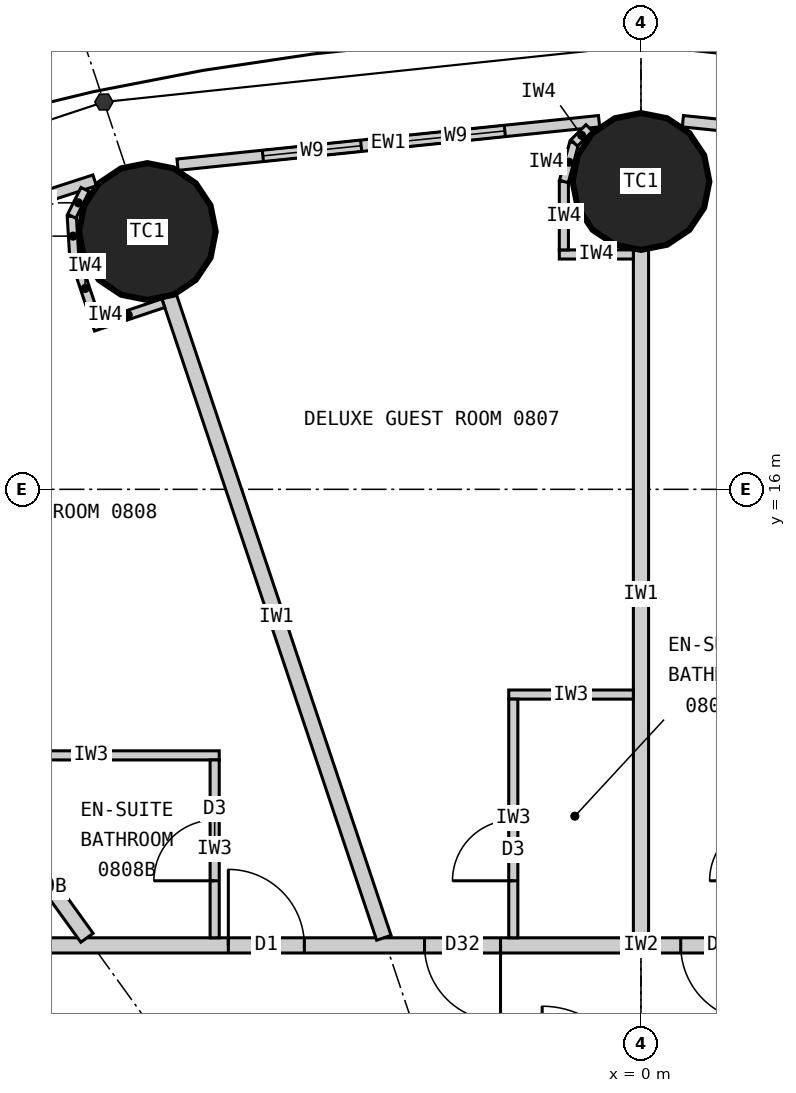
"""IFC4 building model, lengths in metres.
Left out: names, types, materials, properties, quantities, classifications, styles, units other than length and angle.
Written with IfcOpenShell. Run it as: python <this file> out.ifc"""

import sys

from ifc_helpers import new_model, si_unit, direction, frame, frame_2d, origin, origin_2d, place, context, subcontext, project, spatial, rectangle, circle, extrude, element, fill, save


model = new_model("IFC4")
c1 = context("Model", 3, precision=1e-05, world=origin(), true_north=direction((0.0, 1.0)))
c2 = subcontext(c1, "Body", "Model", "MODEL_VIEW")
j1 = project(units=[si_unit("LENGTHUNIT", "METRE"), si_unit("PLANEANGLEUNIT", "RADIAN")], contexts=[c1])
p1 = place(None, origin())
s1 = spatial("IfcSite", under=j1, at=p1, CompositionType="ELEMENT")
p2 = place(p1, origin())
s2 = spatial("IfcBuilding", under=s1, at=p2, CompositionType="ELEMENT")
p3 = place(p2, frame((0.0, 0.0, 39.3)))
s3 = spatial("IfcBuildingStorey", under=s2, at=p3, CompositionType="ELEMENT", Elevation=39.3)
for number, where, z_axis, x_axis in (
    (1, (0.0, 20.05, 0.0), (0.0, 0.0, 1.0), (1.0, 0.0, 0.0)),
    (2, (-6.495, 19.391, 0.0), (0.0, 0.0, 1.0), (1.0, 0.0, 0.0)),
):
    element("IfcColumn", number, at=place(p3, frame(where, z_axis=z_axis, x_axis=x_axis)), inside=s3, PredefinedType="COLUMN", context=c2, shape_type="SweptSolid", body=[
        extrude(circle(Radius=0.9, at=origin_2d()), origin(), (0.0, 0.0, 1.0), 3.3),
    ])
p4 = place(p3, frame((6.098, 20.271, 0.0), z_axis=(0.0, 0.0, 1.0), x_axis=(-0.994723735084, 0.102589915983, 0.0)))
e3 = element("IfcWall", 3, at=p4, inside=s3, PredefinedType="ELEMENTEDWALL", context=c2, shape_type="SweptSolid", body=[
    extrude(rectangle(XDim=5.576, YDim=0.15, at=frame_2d((2.788, 0.0))), origin(), (0.0, 0.0, 1.0), 3.12),
])
p5 = place(p4, frame((1.129, 0.0, 0.9)))
e4 = element("IfcOpeningElement", 4, at=p5, cuts=e3, PredefinedType="OPENING", context=c2, shape_type="SweptSolid", body=[
    extrude(rectangle(XDim=1.3, YDim=1.9, at=frame_2d((0.65, 0.95))), frame((0.0, 0.085, 0.0), z_axis=(0.0, -1.0, 0.0), x_axis=(1.0, 0.0, 0.0)), (0.0, 0.0, 1.0), 0.17),
])
p6 = place(p4, frame((3.029, 0.0, 0.9)))
e5 = element("IfcOpeningElement", 5, at=p6, cuts=e3, PredefinedType="OPENING", context=c2, shape_type="SweptSolid", body=[
    extrude(rectangle(XDim=1.3, YDim=1.9, at=frame_2d((0.65, 0.95))), frame((0.0, 0.085, 0.0), z_axis=(0.0, -1.0, 0.0), x_axis=(1.0, 0.0, 0.0)), (0.0, 0.0, 1.0), 0.17),
])
p7 = place(p3, frame((-0.551, 20.843, 0.0), z_axis=(0.0, 0.0, 1.0), x_axis=(-0.994723735084, -0.102589915983, 0.0)))
e6 = element("IfcWall", 6, at=p7, inside=s3, PredefinedType="ELEMENTEDWALL", context=c2, shape_type="SweptSolid", body=[
    extrude(rectangle(XDim=5.576, YDim=0.15, at=frame_2d((2.788, 0.0))), origin(), (0.0, 0.0, 1.0), 3.12),
])
p8 = place(p7, frame((1.247, 0.0, 0.9)))
e7 = element("IfcOpeningElement", 7, at=p8, cuts=e6, PredefinedType="OPENING", context=c2, shape_type="SweptSolid", body=[
    extrude(rectangle(XDim=1.3, YDim=1.9, at=frame_2d((0.65, 0.95))), frame((0.0, 0.085, 0.0), z_axis=(0.0, -1.0, 0.0), x_axis=(1.0, 0.0, 0.0)), (0.0, 0.0, 1.0), 0.17),
])
p9 = place(p7, frame((3.147, 0.0, 0.9)))
e8 = element("IfcOpeningElement", 8, at=p9, cuts=e6, PredefinedType="OPENING", context=c2, shape_type="SweptSolid", body=[
    extrude(rectangle(XDim=1.3, YDim=1.9, at=frame_2d((0.65, 0.95))), frame((0.0, 0.085, 0.0), z_axis=(0.0, -1.0, 0.0), x_axis=(1.0, 0.0, 0.0)), (0.0, 0.0, 1.0), 0.17),
])
p10 = place(p3, frame((-7.188, 20.065, 0.0), z_axis=(0.0, 0.0, 1.0), x_axis=(-0.951138486029, -0.308764603532, 0.0)))
e9 = element("IfcWall", 9, at=p10, inside=s3, PredefinedType="ELEMENTEDWALL", context=c2, shape_type="SweptSolid", body=[
    extrude(rectangle(XDim=5.444, YDim=0.15, at=frame_2d((2.722, 0.0))), origin(), (0.0, 0.0, 1.0), 3.12),
])
p11 = place(p10, frame((1.284, 0.0, 0.9)))
e10 = element("IfcOpeningElement", 10, at=p11, cuts=e9, PredefinedType="OPENING", context=c2, shape_type="SweptSolid", body=[
    extrude(rectangle(XDim=1.3, YDim=1.9, at=frame_2d((0.65, 0.95))), frame((0.0, 0.085, 0.0), z_axis=(0.0, -1.0, 0.0), x_axis=(1.0, 0.0, 0.0)), (0.0, 0.0, 1.0), 0.17),
])
p12 = place(p10, frame((3.184, 0.0, 0.9)))
e11 = element("IfcOpeningElement", 11, at=p12, cuts=e9, PredefinedType="OPENING", context=c2, shape_type="SweptSolid", body=[
    extrude(rectangle(XDim=1.3, YDim=1.9, at=frame_2d((0.65, 0.95))), frame((0.0, 0.085, 0.0), z_axis=(0.0, -1.0, 0.0), x_axis=(1.0, 0.0, 0.0)), (0.0, 0.0, 1.0), 0.17),
])
p13 = place(p3, frame((-14.1, 10.0, 0.0), z_axis=(0.0, 0.0, 1.0), x_axis=(1.0, 0.0, 0.0)))
e12 = element("IfcWall", 12, at=p13, inside=s3, PredefinedType="PARTITIONING", context=c2, shape_type="SweptSolid", body=[
    extrude(rectangle(XDim=28.2, YDim=0.2, at=frame_2d((14.1, 0.0))), origin(), (0.0, 0.0, 1.0), 3.12),
])
p14 = place(p13, frame((23.477, 0.0, 0.0)))
e13 = element("IfcOpeningElement", 13, at=p14, cuts=e12, PredefinedType="OPENING", context=c2, shape_type="SweptSolid", body=[
    extrude(rectangle(XDim=1.0, YDim=2.2, at=frame_2d((0.5, 1.1))), frame((0.0, 0.11, 0.0), z_axis=(0.0, -1.0, 0.0), x_axis=(1.0, 0.0, 0.0)), (0.0, 0.0, 1.0), 0.22),
])
p15 = place(p13, frame((18.529, 0.0, 0.0)))
e14 = element("IfcOpeningElement", 14, at=p15, cuts=e12, PredefinedType="OPENING", context=c2, shape_type="SweptSolid", body=[
    extrude(rectangle(XDim=1.0, YDim=2.2, at=frame_2d((0.5, 1.1))), frame((0.0, 0.11, 0.0), z_axis=(0.0, -1.0, 0.0), x_axis=(1.0, 0.0, 0.0)), (0.0, 0.0, 1.0), 0.22),
])
p16 = place(p13, frame((14.623, 0.0, 0.0)))
e15 = element("IfcOpeningElement", 15, at=p16, cuts=e12, PredefinedType="OPENING", context=c2, shape_type="SweptSolid", body=[
    extrude(rectangle(XDim=1.0, YDim=2.2, at=frame_2d((0.5, 1.1))), frame((0.0, 0.11, 0.0), z_axis=(0.0, -1.0, 0.0), x_axis=(1.0, 0.0, 0.0)), (0.0, 0.0, 1.0), 0.22),
])
p17 = place(p13, frame((11.252, 0.0, 0.0)))
e16 = element("IfcOpeningElement", 16, at=p17, cuts=e12, PredefinedType="OPENING", context=c2, shape_type="SweptSolid", body=[
    extrude(rectangle(XDim=1.0, YDim=2.1, at=frame_2d((0.5, 1.05))), frame((0.0, 0.11, 0.0), z_axis=(0.0, -1.0, 0.0), x_axis=(1.0, 0.0, 0.0)), (0.0, 0.0, 1.0), 0.22),
])
p18 = place(p13, frame((8.671, 0.0, 0.0)))
e17 = element("IfcOpeningElement", 17, at=p18, cuts=e12, PredefinedType="OPENING", context=c2, shape_type="SweptSolid", body=[
    extrude(rectangle(XDim=1.0, YDim=2.2, at=frame_2d((0.5, 1.1))), frame((0.0, 0.11, 0.0), z_axis=(0.0, -1.0, 0.0), x_axis=(1.0, 0.0, 0.0)), (0.0, 0.0, 1.0), 0.22),
])
p19 = place(p13, frame((1.616, 0.0, 0.0)))
e18 = element("IfcOpeningElement", 18, at=p19, cuts=e12, PredefinedType="OPENING", context=c2, shape_type="SweptSolid", body=[
    extrude(rectangle(XDim=1.0, YDim=2.2, at=frame_2d((0.5, 1.1))), frame((0.0, 0.11, 0.0), z_axis=(0.0, -1.0, 0.0), x_axis=(1.0, 0.0, 0.0)), (0.0, 0.0, 1.0), 0.22),
])
p20 = place(p3, frame((0.0, 10.1, 0.0), z_axis=(0.0, 0.0, 1.0), x_axis=(0.0, 1.0, 0.0)))
e19 = element("IfcWall", 19, at=p20, inside=s3, PredefinedType="PARTITIONING", context=c2, shape_type="SweptSolid", body=[
    extrude(rectangle(XDim=9.05, YDim=0.2, at=frame_2d((4.525, 0.0))), origin(), (0.0, 0.0, 1.0), 2.32),
])
p21 = place(p3, frame((-3.383, 10.1, 0.0), z_axis=(0.0, 0.0, 1.0), x_axis=(-0.317593727596, 0.948226884344, 0.0)))
e20 = element("IfcWall", 20, at=p21, inside=s3, PredefinedType="PARTITIONING", context=c2, shape_type="SweptSolid", body=[
    extrude(rectangle(XDim=8.899, YDim=0.2, at=frame_2d((4.449, 0.0))), origin(), (0.0, 0.0, 1.0), 2.32),
])
p22 = place(p3, frame((-7.289, 10.1, 0.0), z_axis=(0.0, 0.0, 1.0), x_axis=(-0.585216319319, 0.810877216108, 0.0)))
e21 = element("IfcWall", 21, at=p22, inside=s3, PredefinedType="PARTITIONING", context=c2, shape_type="SweptSolid", body=[
    extrude(rectangle(XDim=8.16, YDim=0.2, at=frame_2d((4.08, 0.0))), origin(), (0.0, 0.0, 1.0), 2.32),
])
p23 = place(p3, frame((-0.1, 13.3, 0.0), z_axis=(0.0, 0.0, 1.0), x_axis=(-1.0, 0.0, 0.0)))
e22 = element("IfcWall", 22, at=p23, inside=s3, PredefinedType="PARTITIONING", context=c2, shape_type="SweptSolid", body=[
    extrude(rectangle(XDim=1.64, YDim=0.12, at=frame_2d((0.82, 0.0))), origin(), (0.0, 0.0, 1.0), 3.12),
])
p24 = place(p3, frame((-1.68, 10.1, 0.0), z_axis=(0.0, 0.0, 1.0), x_axis=(0.0, 1.0, 0.0)))
e23 = element("IfcWall", 23, at=p24, inside=s3, PredefinedType="PARTITIONING", context=c2, shape_type="SweptSolid", body=[
    extrude(rectangle(XDim=3.14, YDim=0.12, at=frame_2d((1.57, 0.0))), origin(), (0.0, 0.0, 1.0), 3.12),
])
p25 = place(p24, frame((0.75, 0.0, 0.0)))
e24 = element("IfcOpeningElement", 24, at=p25, cuts=e23, PredefinedType="OPENING", context=c2, shape_type="SweptSolid", body=[
    extrude(rectangle(XDim=0.8, YDim=2.1, at=frame_2d((0.4, 1.05))), frame((0.0, 0.07, 0.0), z_axis=(0.0, -1.0, 0.0), x_axis=(1.0, 0.0, 0.0)), (0.0, 0.0, 1.0), 0.14),
])
p26 = place(p3, frame((-8.921, 12.5, 0.0), z_axis=(0.0, 0.0, 1.0), x_axis=(1.0, 0.0, 0.0)))
e25 = element("IfcWall", 25, at=p26, inside=s3, PredefinedType="PARTITIONING", context=c2, shape_type="SweptSolid", body=[
    extrude(rectangle(XDim=3.372, YDim=0.12, at=frame_2d((1.686, 0.0))), origin(), (0.0, 0.0, 1.0), 3.12),
])
p27 = place(p3, frame((-5.609, 10.1, 0.0), z_axis=(0.0, 0.0, 1.0), x_axis=(0.0, 1.0, 0.0)))
e26 = element("IfcWall", 26, at=p27, inside=s3, PredefinedType="PARTITIONING", context=c2, shape_type="SweptSolid", body=[
    extrude(rectangle(XDim=2.34, YDim=0.12, at=frame_2d((1.17, 0.0))), origin(), (0.0, 0.0, 1.0), 3.12),
])
p28 = place(p27, frame((0.75, 0.0, 0.0)))
e27 = element("IfcOpeningElement", 27, at=p28, cuts=e26, PredefinedType="OPENING", context=c2, shape_type="SweptSolid", body=[
    extrude(rectangle(XDim=0.8, YDim=2.1, at=frame_2d((0.4, 1.05))), frame((0.0, 0.07, 0.0), z_axis=(0.0, -1.0, 0.0), x_axis=(1.0, 0.0, 0.0)), (0.0, 0.0, 1.0), 0.14),
])
p29 = place(p3, frame((-0.1, 19.09, 0.0), z_axis=(0.0, 0.0, 1.0), x_axis=(-1.0, 0.0, 0.0)))
e28 = element("IfcWall", 28, at=p29, inside=s3, PredefinedType="PARTITIONING", context=c2, shape_type="SweptSolid", body=[
    extrude(rectangle(XDim=0.974, YDim=0.12, at=frame_2d((0.487, 0.0))), origin(), (0.0, 0.0, 1.0), 3.12),
])
p30 = place(p3, frame((-1.015, 19.15, 0.0), z_axis=(0.0, 0.0, 1.0), x_axis=(0.0, 1.0, 0.0)))
e29 = element("IfcWall", 29, at=p30, inside=s3, PredefinedType="PARTITIONING", context=c2, shape_type="SweptSolid", body=[
    extrude(rectangle(XDim=0.9, YDim=0.12, at=frame_2d((0.45, 0.0))), origin(), (0.0, 0.0, 1.0), 3.12),
])
p31 = place(p3, frame((-1.015, 20.05, 0.0), z_axis=(0.0, 0.0, 1.0), x_axis=(0.258906465625, 0.96590239779, 0.0)))
e30 = element("IfcWall", 30, at=p31, inside=s3, PredefinedType="PARTITIONING", context=c2, shape_type="SweptSolid", body=[
    extrude(rectangle(XDim=0.525, YDim=0.12, at=frame_2d((0.263, 0.0))), origin(), (0.0, 0.0, 1.0), 3.12),
])
p32 = place(p3, frame((-0.879, 20.557, 0.0), z_axis=(0.0, 0.0, 1.0), x_axis=(0.707106781187, 0.707106781187, 0.0)))
e31 = element("IfcWall", 31, at=p32, inside=s3, PredefinedType="PARTITIONING", context=c2, shape_type="SweptSolid", body=[
    extrude(rectangle(XDim=0.279, YDim=0.12, at=frame_2d((0.14, 0.0))), origin(), (0.0, 0.0, 1.0), 3.12),
])
p33 = place(p3, frame((-6.285, 18.449, 0.0), z_axis=(0.0, 0.0, 1.0), x_axis=(-0.948281677008, -0.317430088446, 0.0)))
e32 = element("IfcWall", 32, at=p33, inside=s3, PredefinedType="PARTITIONING", context=c2, shape_type="SweptSolid", body=[
    extrude(rectangle(XDim=0.974, YDim=0.12, at=frame_2d((0.487, 0.0))), origin(), (0.0, 0.0, 1.0), 3.12),
])
p34 = place(p3, frame((-7.171, 18.216, 0.0), z_axis=(0.0, 0.0, 1.0), x_axis=(-0.317692409458, 0.94819382669, 0.0)))
e33 = element("IfcWall", 33, at=p34, inside=s3, PredefinedType="PARTITIONING", context=c2, shape_type="SweptSolid", body=[
    extrude(rectangle(XDim=0.9, YDim=0.12, at=frame_2d((0.45, 0.0))), origin(), (0.0, 0.0, 1.0), 3.12),
])
p35 = place(p3, frame((-7.457, 19.069, 0.0), z_axis=(0.0, 0.0, 1.0), x_axis=(-0.061365267648, 0.99811537606, 0.0)))
e34 = element("IfcWall", 34, at=p35, inside=s3, PredefinedType="PARTITIONING", context=c2, shape_type="SweptSolid", body=[
    extrude(rectangle(XDim=0.525, YDim=0.12, at=frame_2d((0.263, 0.0))), origin(), (0.0, 0.0, 1.0), 3.12),
])
p36 = place(p3, frame((-7.489, 19.593, 0.0), z_axis=(0.0, 0.0, 1.0), x_axis=(0.446218959337, 0.89492381817, 0.0)))
e35 = element("IfcWall", 35, at=p36, inside=s3, PredefinedType="PARTITIONING", context=c2, shape_type="SweptSolid", body=[
    extrude(rectangle(XDim=0.393, YDim=0.12, at=frame_2d((0.196, 0.0))), origin(), (0.0, 0.0, 1.0), 3.12),
])
p37 = place(p8, origin())
e36 = element("IfcWindow", 36, at=p37, inside=s3, PartitioningType="SINGLE_PANEL", PredefinedType="WINDOW", context=c2, shape_type="SweptSolid", body=[
    extrude(rectangle(XDim=1.3, YDim=1.9, at=frame_2d((0.65, 0.95))), frame((0.0, 0.03, 0.0), z_axis=(0.0, -1.0, 0.0), x_axis=(1.0, 0.0, 0.0)), (0.0, 0.0, 1.0), 0.06),
])
fill(e7, e36)
p38 = place(p9, origin())
e37 = element("IfcWindow", 37, at=p38, inside=s3, PartitioningType="SINGLE_PANEL", PredefinedType="WINDOW", context=c2, shape_type="SweptSolid", body=[
    extrude(rectangle(XDim=1.3, YDim=1.9, at=frame_2d((0.65, 0.95))), frame((0.0, 0.03, 0.0), z_axis=(0.0, -1.0, 0.0), x_axis=(1.0, 0.0, 0.0)), (0.0, 0.0, 1.0), 0.06),
])
fill(e8, e37)
p39 = place(p16, origin())
e38 = element("IfcDoor", 38, at=p39, inside=s3, OperationType="SINGLE_SWING_RIGHT", PredefinedType="DOOR", context=c2, shape_type="SweptSolid", body=[
    extrude(rectangle(XDim=1.0, YDim=2.2, at=frame_2d((0.5, 1.1))), frame((0.0, 0.025, 0.0), z_axis=(0.0, -1.0, 0.0), x_axis=(1.0, 0.0, 0.0)), (0.0, 0.0, 1.0), 0.05),
])
fill(e15, e38)
p40 = place(p25, origin())
e39 = element("IfcDoor", 39, at=p40, inside=s3, OperationType="SINGLE_SWING_LEFT", PredefinedType="DOOR", context=c2, shape_type="SweptSolid", body=[
    extrude(rectangle(XDim=0.8, YDim=2.1, at=frame_2d((0.4, 1.05))), frame((0.0, 0.025, 0.0), z_axis=(0.0, -1.0, 0.0), x_axis=(1.0, 0.0, 0.0)), (0.0, 0.0, 1.0), 0.05),
])
fill(e24, e39)
p41 = place(p17, origin())
e40 = element("IfcDoor", 40, at=p41, inside=s3, OperationType="SINGLE_SWING_RIGHT", PredefinedType="DOOR", context=c2, shape_type="SweptSolid", body=[
    extrude(rectangle(XDim=1.0, YDim=2.1, at=frame_2d((0.5, 1.05))), frame((0.0, 0.025, 0.0), z_axis=(0.0, -1.0, 0.0), x_axis=(1.0, 0.0, 0.0)), (0.0, 0.0, 1.0), 0.05),
])
fill(e16, e40)
p42 = place(p28, origin())
e41 = element("IfcDoor", 41, at=p42, inside=s3, OperationType="SINGLE_SWING_LEFT", PredefinedType="DOOR", context=c2, shape_type="SweptSolid", body=[
    extrude(rectangle(XDim=0.8, YDim=2.1, at=frame_2d((0.4, 1.05))), frame((0.0, 0.025, 0.0), z_axis=(0.0, -1.0, 0.0), x_axis=(1.0, 0.0, 0.0)), (0.0, 0.0, 1.0), 0.05),
])
fill(e27, e41)
p43 = place(p18, origin())
e42 = element("IfcDoor", 42, at=p43, inside=s3, OperationType="SINGLE_SWING_LEFT", PredefinedType="DOOR", context=c2, shape_type="SweptSolid", body=[
    extrude(rectangle(XDim=1.0, YDim=2.2, at=frame_2d((0.5, 1.1))), frame((0.0, 0.025, 0.0), z_axis=(0.0, -1.0, 0.0), x_axis=(1.0, 0.0, 0.0)), (0.0, 0.0, 1.0), 0.05),
])
fill(e17, e42)
save(model, sys.argv[1])
